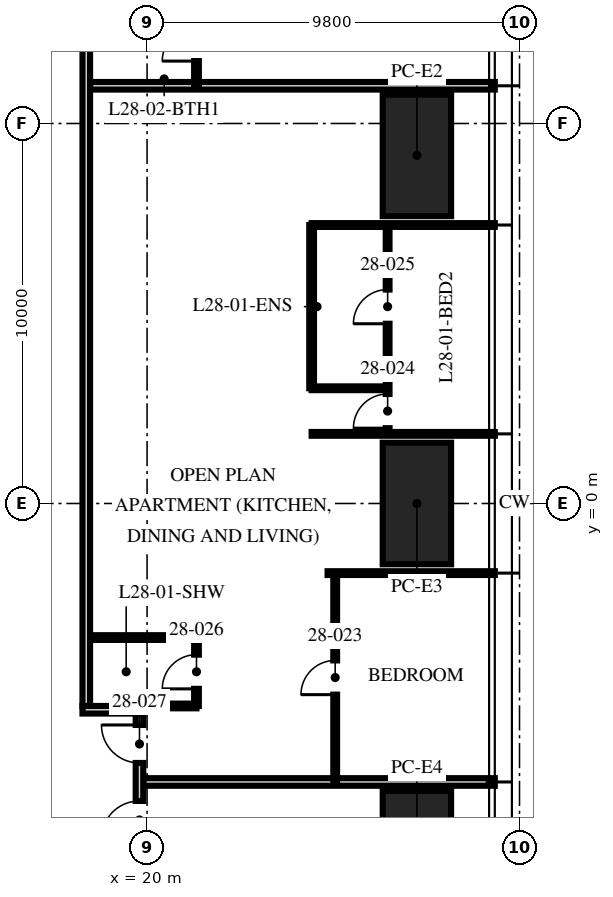
"""IFC4 building model, lengths in metres.
Left out: names, types, materials, properties, quantities, classifications, styles, units other than length and angle.
Written with IfcOpenShell. Run it as: python <this file> out.ifc"""

import sys

from ifc_helpers import new_model, si_unit, direction, frame, frame_2d, origin, origin_2d, place, context, subcontext, project, spatial, rectangle, hollow_rectangle, extrude, element, fill, save


model = new_model("IFC4")
c1 = context("Model", 3, precision=1e-05, world=origin(), true_north=direction((0.0, 1.0)))
c2 = subcontext(c1, "Body", "Model", "MODEL_VIEW")
j1 = project(units=[si_unit("LENGTHUNIT", "METRE"), si_unit("PLANEANGLEUNIT", "RADIAN")], contexts=[c1])
p1 = place(None, origin())
s1 = spatial("IfcSite", under=j1, at=p1, CompositionType="ELEMENT")
p2 = place(p1, origin())
s2 = spatial("IfcBuilding", under=s1, at=p2, CompositionType="ELEMENT")
p3 = place(p2, frame((0.0, 0.0, 114.75)))
s3 = spatial("IfcBuildingStorey", under=s2, at=p3, CompositionType="ELEMENT", Elevation=114.75)
for number, where, z_axis, x_axis in (
    (1, (27.1, 9.16, 0.0), (0.0, 0.0, 1.0), (0.0, 1.0, 0.0)),
    (2, (27.1, 0.0, 0.0), (0.0, 0.0, 1.0), (0.0, 1.0, 0.0)),
    (3, (27.1, -9.16, 0.0), (0.0, 0.0, 1.0), (0.0, 1.0, 0.0)),
):
    element("IfcColumn", number, at=place(p3, frame(where, z_axis=z_axis, x_axis=x_axis)), inside=s3, PredefinedType="COLUMN", context=c2, shape_type="SweptSolid", body=[
        extrude(hollow_rectangle(XDim=3.2, YDim=1.8, WallThickness=0.2, at=origin_2d()), origin(), (0.0, 0.0, 1.0), 3.75),
    ])
p4 = place(p3, frame((19.9, -7.328, 0.0), z_axis=(0.0, 0.0, 1.0), x_axis=(1.0, 0.0, 0.0)))
e4 = element("IfcWall", 4, at=p4, inside=s3, PredefinedType="PARTITIONING", context=c2, shape_type="SweptSolid", body=[
    extrude(rectangle(XDim=9.25, YDim=0.2, at=frame_2d((4.625, 0.0))), origin(), (0.0, 0.0, 1.0), 2.81),
])
p5 = place(p3, frame((24.75, -1.832, 0.0), z_axis=(0.0, 0.0, 1.0), x_axis=(1.0, 0.0, 0.0)))
e5 = element("IfcWall", 5, at=p5, inside=s3, PredefinedType="PARTITIONING", context=c2, shape_type="SweptSolid", body=[
    extrude(rectangle(XDim=4.4, YDim=0.1, at=frame_2d((2.2, 0.0))), origin(), (0.0, 0.0, 1.0), 2.81),
])
for number, where, z_axis, x_axis in (
    (6, (24.33, 1.832, 0.0), (0.0, 0.0, 1.0), (1.0, 0.0, 0.0)),
    (7, (24.33, 7.328, 0.0), (0.0, 0.0, 1.0), (1.0, 0.0, 0.0)),
):
    element("IfcWall", number, at=place(p3, frame(where, z_axis=z_axis, x_axis=x_axis)), inside=s3, PredefinedType="PARTITIONING", context=c2, shape_type="SweptSolid", body=[
        extrude(rectangle(XDim=4.82, YDim=0.1, at=frame_2d((2.41, 0.0))), origin(), (0.0, 0.0, 1.0), 2.81),
    ])
p6 = place(p3, frame((18.5, 10.992, 0.0), z_axis=(0.0, 0.0, 1.0), x_axis=(1.0, 0.0, 0.0)))
e8 = element("IfcWall", 8, at=p6, inside=s3, PredefinedType="PARTITIONING", context=c2, shape_type="SweptSolid", body=[
    extrude(rectangle(XDim=10.65, YDim=0.2, at=frame_2d((5.325, 0.0))), origin(), (0.0, 0.0, 1.0), 2.81),
])
p7 = place(p3, frame((24.95, -7.328, 0.0), z_axis=(0.0, 0.0, 1.0), x_axis=(0.0, 1.0, 0.0)))
e9 = element("IfcWall", 9, at=p7, inside=s3, PredefinedType="PARTITIONING", context=c2, shape_type="SweptSolid", body=[
    extrude(rectangle(XDim=5.496, YDim=0.1, at=frame_2d((2.748, 0.0))), origin(), (0.0, 0.0, 1.0), 2.81),
])
p8 = place(p7, frame((2.298, 0.0, 0.0)))
e10 = element("IfcOpeningElement", 10, at=p8, cuts=e9, PredefinedType="OPENING", context=c2, shape_type="SweptSolid", body=[
    extrude(rectangle(XDim=0.9, YDim=2.1, at=frame_2d((0.45, 1.05))), frame((0.0, 0.06, 0.0), z_axis=(0.0, -1.0, 0.0), x_axis=(1.0, 0.0, 0.0)), (0.0, 0.0, 1.0), 0.12),
])
p9 = place(p3, frame((26.33, 1.832, 0.0), z_axis=(0.0, 0.0, 1.0), x_axis=(0.0, 1.0, 0.0)))
e11 = element("IfcWall", 11, at=p9, inside=s3, PredefinedType="PARTITIONING", context=c2, shape_type="SweptSolid", body=[
    extrude(rectangle(XDim=5.496, YDim=0.1, at=frame_2d((2.748, 0.0))), origin(), (0.0, 0.0, 1.0), 2.81),
])
p10 = place(p9, frame((0.15, 0.0, 0.0)))
e12 = element("IfcOpeningElement", 12, at=p10, cuts=e11, PredefinedType="OPENING", context=c2, shape_type="SweptSolid", body=[
    extrude(rectangle(XDim=0.9, YDim=2.1, at=frame_2d((0.45, 1.05))), frame((0.0, 0.06, 0.0), z_axis=(0.0, -1.0, 0.0), x_axis=(1.0, 0.0, 0.0)), (0.0, 0.0, 1.0), 0.12),
])
p11 = place(p9, frame((2.898, 0.0, 0.0)))
e13 = element("IfcOpeningElement", 13, at=p11, cuts=e11, PredefinedType="OPENING", context=c2, shape_type="SweptSolid", body=[
    extrude(rectangle(XDim=0.9, YDim=2.1, at=frame_2d((0.45, 1.05))), frame((0.0, 0.06, 0.0), z_axis=(0.0, -1.0, 0.0), x_axis=(1.0, 0.0, 0.0)), (0.0, 0.0, 1.0), 0.12),
])
p12 = place(p3, frame((24.33, 3.032, 0.0), z_axis=(0.0, 0.0, 1.0), x_axis=(1.0, 0.0, 0.0)))
e14 = element("IfcWall", 14, at=p12, inside=s3, PredefinedType="PARTITIONING", context=c2, shape_type="SweptSolid", body=[
    extrude(rectangle(XDim=2.0, YDim=0.1, at=frame_2d((1.0, 0.0))), origin(), (0.0, 0.0, 1.0), 3.5),
])
p13 = place(p3, frame((24.33, 3.032, 0.0), z_axis=(0.0, 0.0, 1.0), x_axis=(0.0, 1.0, 0.0)))
e15 = element("IfcWall", 15, at=p13, inside=s3, PredefinedType="PARTITIONING", context=c2, shape_type="SweptSolid", body=[
    extrude(rectangle(XDim=4.296, YDim=0.125, at=frame_2d((2.148, 0.0))), origin(), (0.0, 0.0, 1.0), 2.81),
])
p14 = place(p3, frame((21.3, -5.328, 0.0), z_axis=(0.0, 0.0, 1.0), x_axis=(0.0, 1.0, 0.0)))
e16 = element("IfcWall", 16, at=p14, inside=s3, PredefinedType="PARTITIONING", context=c2, shape_type="SweptSolid", body=[
    extrude(rectangle(XDim=1.8, YDim=0.125, at=frame_2d((0.9, 0.0))), origin(), (0.0, 0.0, 1.0), 2.81),
])
p15 = place(p14, frame((0.45, 0.0, 0.0)))
e17 = element("IfcOpeningElement", 17, at=p15, cuts=e16, PredefinedType="OPENING", context=c2, shape_type="SweptSolid", body=[
    extrude(rectangle(XDim=0.9, YDim=2.1, at=frame_2d((0.45, 1.05))), frame((0.0, 0.073, 0.0), z_axis=(0.0, -1.0, 0.0), x_axis=(1.0, 0.0, 0.0)), (0.0, 0.0, 1.0), 0.145),
])
p16 = place(p3, frame((19.97, -5.328, 0.0), z_axis=(0.0, 0.0, 1.0), x_axis=(1.0, 0.0, 0.0)))
e18 = element("IfcWall", 18, at=p16, inside=s3, PredefinedType="PARTITIONING", context=c2, shape_type="SweptSolid", body=[
    extrude(rectangle(XDim=1.33, YDim=0.125, at=frame_2d((0.665, 0.0))), origin(), (0.0, 0.0, 1.0), 3.5),
])
p17 = place(p3, frame((18.5, -3.528, 0.0), z_axis=(0.0, 0.0, 1.0), x_axis=(1.0, 0.0, 0.0)))
e19 = element("IfcWall", 19, at=p17, inside=s3, PredefinedType="PARTITIONING", context=c2, shape_type="SweptSolid", body=[
    extrude(rectangle(XDim=2.8, YDim=0.125, at=frame_2d((1.4, 0.0))), origin(), (0.0, 0.0, 1.0), 3.5),
])
p18 = place(p3, frame((21.3, 10.992, 0.0), z_axis=(0.0, 0.0, 1.0), x_axis=(0.0, 1.0, 0.0)))
e20 = element("IfcWall", 20, at=p18, inside=s3, PredefinedType="PARTITIONING", context=c2, shape_type="SweptSolid", body=[
    extrude(rectangle(XDim=2.2, YDim=0.125, at=frame_2d((1.1, 0.0))), origin(), (0.0, 0.0, 1.0), 3.5),
])
p19 = place(p18, frame((0.65, 0.0, 0.0)))
e21 = element("IfcOpeningElement", 21, at=p19, cuts=e20, PredefinedType="OPENING", context=c2, shape_type="SweptSolid", body=[
    extrude(rectangle(XDim=0.9, YDim=2.1, at=frame_2d((0.45, 1.05))), frame((0.0, 0.073, 0.0), z_axis=(0.0, -1.0, 0.0), x_axis=(1.0, 0.0, 0.0)), (0.0, 0.0, 1.0), 0.145),
])
p20 = place(p3, frame((18.3, -5.428, 0.0), z_axis=(0.0, 0.0, 1.0), x_axis=(1.0, 0.0, 0.0)))
e22 = element("IfcWall", 22, at=p20, inside=s3, PredefinedType="PARTITIONING", context=c2, shape_type="SweptSolid", body=[
    extrude(rectangle(XDim=1.6, YDim=0.2, at=frame_2d((0.8, 0.0))), origin(), (0.0, 0.0, 1.0), 3.5),
])
p21 = place(p3, frame((19.8, -9.128, 0.0), z_axis=(0.0, 0.0, 1.0), x_axis=(0.0, 1.0, 0.0)))
e23 = element("IfcWall", 23, at=p21, inside=s3, PredefinedType="PARTITIONING", context=c2, shape_type="SweptSolid", body=[
    extrude(rectangle(XDim=3.6, YDim=0.2, at=frame_2d((1.8, 0.0))), origin(), (0.0, 0.0, 1.0), 2.7),
])
p22 = place(p21, frame((2.3, 0.0, 0.0)))
e24 = element("IfcOpeningElement", 24, at=p22, cuts=e23, PredefinedType="OPENING", context=c2, shape_type="SweptSolid", body=[
    extrude(rectangle(XDim=1.0, YDim=2.2, at=frame_2d((0.5, 1.1))), frame((0.0, 0.11, 0.0), z_axis=(0.0, -1.0, 0.0), x_axis=(1.0, 0.0, 0.0)), (0.0, 0.0, 1.0), 0.22),
])
p23 = place(p21, frame((0.3, 0.0, 0.0)))
e25 = element("IfcOpeningElement", 25, at=p23, cuts=e23, PredefinedType="OPENING", context=c2, shape_type="SweptSolid", body=[
    extrude(rectangle(XDim=1.0, YDim=2.2, at=frame_2d((0.5, 1.1))), frame((0.0, 0.11, 0.0), z_axis=(0.0, -1.0, 0.0), x_axis=(1.0, 0.0, 0.0)), (0.0, 0.0, 1.0), 0.22),
])
p24 = place(p3, frame((18.4, -5.328, 0.0), z_axis=(0.0, 0.0, 1.0), x_axis=(0.0, 1.0, 0.0)))
e26 = element("IfcWall", 26, at=p24, inside=s3, PredefinedType="PARTITIONING", context=c2, shape_type="SweptSolid", body=[
    extrude(rectangle(XDim=22.028, YDim=0.2, at=frame_2d((11.014, 0.0))), origin(), (0.0, 0.0, 1.0), 2.7),
])
p25 = place(p24, frame((19.84, 0.0, 0.0)))
e27 = element("IfcOpeningElement", 27, at=p25, cuts=e26, PredefinedType="OPENING", context=c2, shape_type="SweptSolid", body=[
    extrude(rectangle(XDim=1.0, YDim=2.2, at=frame_2d((0.5, 1.1))), frame((0.0, 0.11, 0.0), z_axis=(0.0, -1.0, 0.0), x_axis=(1.0, 0.0, 0.0)), (0.0, 0.0, 1.0), 0.22),
])
p26 = place(p8, origin())
e28 = element("IfcDoor", 28, at=p26, inside=s3, OperationType="SINGLE_SWING_LEFT", PredefinedType="DOOR", context=c2, shape_type="SweptSolid", body=[
    extrude(rectangle(XDim=0.9, YDim=2.1, at=frame_2d((0.45, 1.05))), frame((0.0, 0.025, 0.0), z_axis=(0.0, -1.0, 0.0), x_axis=(1.0, 0.0, 0.0)), (0.0, 0.0, 1.0), 0.05),
])
fill(e10, e28)
p27 = place(p10, origin())
e29 = element("IfcDoor", 29, at=p27, inside=s3, OperationType="SINGLE_SWING_LEFT", PredefinedType="DOOR", context=c2, shape_type="SweptSolid", body=[
    extrude(rectangle(XDim=0.9, YDim=2.1, at=frame_2d((0.45, 1.05))), frame((0.0, 0.025, 0.0), z_axis=(0.0, -1.0, 0.0), x_axis=(1.0, 0.0, 0.0)), (0.0, 0.0, 1.0), 0.05),
])
fill(e12, e29)
p28 = place(p11, origin())
e30 = element("IfcDoor", 30, at=p28, inside=s3, OperationType="SINGLE_SWING_LEFT", PredefinedType="DOOR", context=c2, shape_type="SweptSolid", body=[
    extrude(rectangle(XDim=0.9, YDim=2.1, at=frame_2d((0.45, 1.05))), frame((0.0, 0.025, 0.0), z_axis=(0.0, -1.0, 0.0), x_axis=(1.0, 0.0, 0.0)), (0.0, 0.0, 1.0), 0.05),
])
fill(e13, e30)
p29 = place(p15, origin())
e31 = element("IfcDoor", 31, at=p29, inside=s3, OperationType="SINGLE_SWING_LEFT", PredefinedType="DOOR", context=c2, shape_type="SweptSolid", body=[
    extrude(rectangle(XDim=0.9, YDim=2.1, at=frame_2d((0.45, 1.05))), frame((0.0, 0.025, 0.0), z_axis=(0.0, -1.0, 0.0), x_axis=(1.0, 0.0, 0.0)), (0.0, 0.0, 1.0), 0.05),
])
fill(e17, e31)
p30 = place(p22, origin())
e32 = element("IfcDoor", 32, at=p30, inside=s3, OperationType="SINGLE_SWING_RIGHT", PredefinedType="DOOR", context=c2, shape_type="SweptSolid", body=[
    extrude(rectangle(XDim=1.0, YDim=2.2, at=frame_2d((0.5, 1.1))), frame((0.0, 0.025, 0.0), z_axis=(0.0, -1.0, 0.0), x_axis=(1.0, 0.0, 0.0)), (0.0, 0.0, 1.0), 0.05),
])
fill(e24, e32)
p31 = place(p19, origin())
e33 = element("IfcDoor", 33, at=p31, inside=s3, OperationType="SINGLE_SWING_LEFT", PredefinedType="DOOR", context=c2, shape_type="SweptSolid", body=[
    extrude(rectangle(XDim=0.9, YDim=2.1, at=frame_2d((0.45, 1.05))), frame((0.0, 0.025, 0.0), z_axis=(0.0, -1.0, 0.0), x_axis=(1.0, 0.0, 0.0)), (0.0, 0.0, 1.0), 0.05),
])
fill(e21, e33)
p32 = place(p23, origin())
e34 = element("IfcDoor", 34, at=p32, inside=s3, OperationType="SINGLE_SWING_LEFT", PredefinedType="DOOR", context=c2, shape_type="SweptSolid", body=[
    extrude(rectangle(XDim=1.0, YDim=2.2, at=frame_2d((0.5, 1.1))), frame((0.0, 0.025, 0.0), z_axis=(0.0, -1.0, 0.0), x_axis=(1.0, 0.0, 0.0)), (0.0, 0.0, 1.0), 0.05),
])
fill(e25, e34)
save(model, sys.argv[1])
